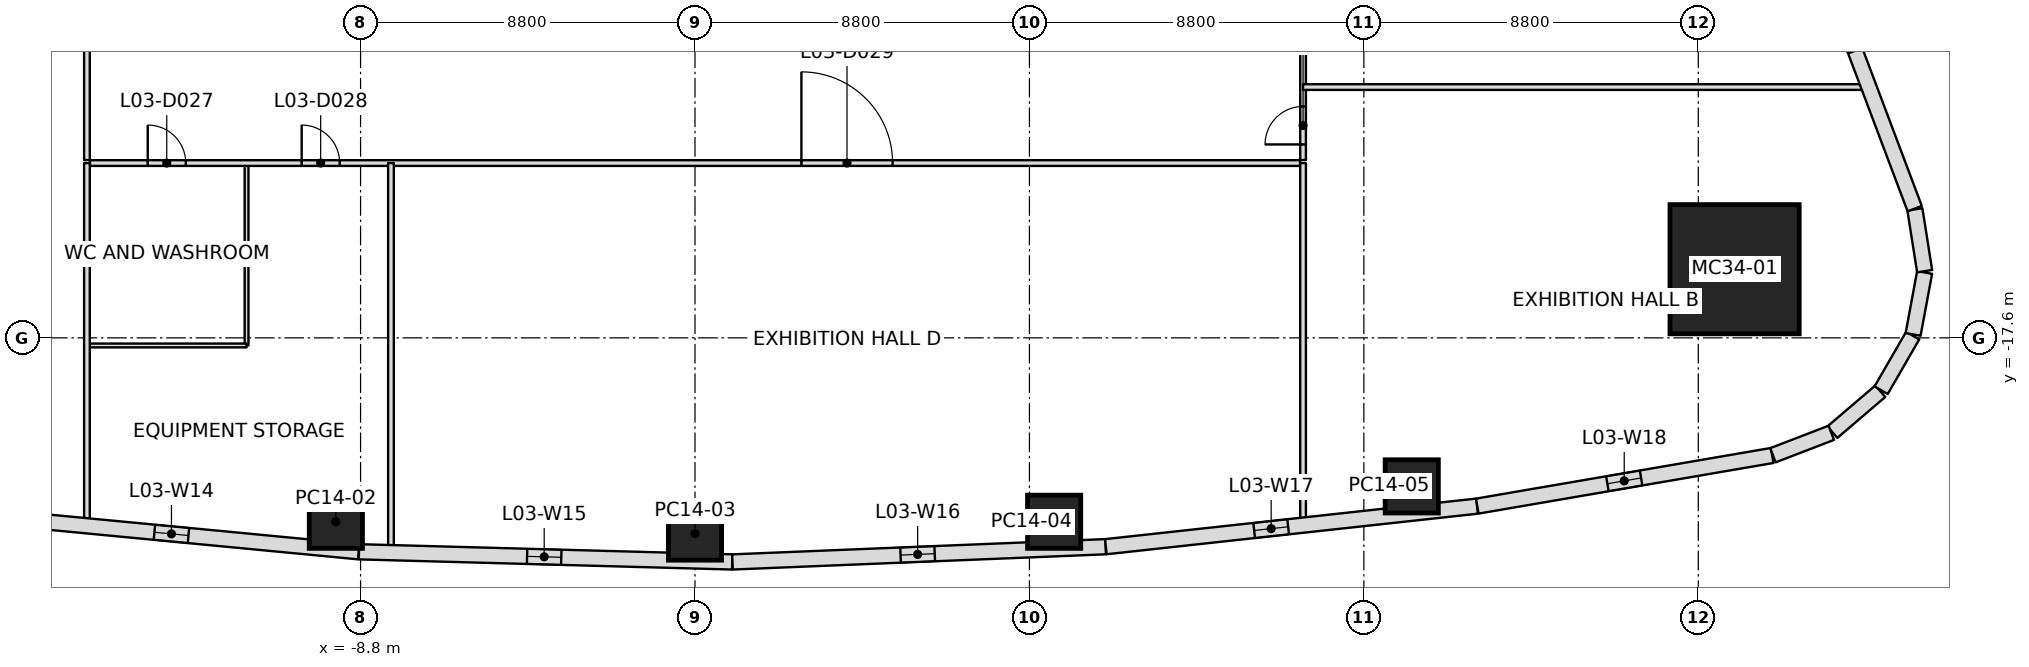
"""IFC4 building model, lengths in metres.
Left out: names, types, materials, properties, quantities, classifications, styles, units other than length and angle.
Written with IfcOpenShell. Run it as: python <this file> out.ifc"""

import sys

from ifc_helpers import new_model, si_unit, direction, frame, frame_2d, origin, origin_2d, place, context, subcontext, project, spatial, rectangle, extrude, element, fill, save


model = new_model("IFC4")
c1 = context("Model", 3, precision=1e-05, world=origin(), true_north=direction((0.0, 1.0)))
c2 = subcontext(c1, "Body", "Model", "MODEL_VIEW")
j1 = project(units=[si_unit("LENGTHUNIT", "METRE"), si_unit("PLANEANGLEUNIT", "RADIAN")], contexts=[c1])
p1 = place(None, origin())
s1 = spatial("IfcSite", under=j1, at=p1, CompositionType="ELEMENT")
p2 = place(p1, origin())
s2 = spatial("IfcBuilding", under=s1, at=p2, CompositionType="ELEMENT")
p3 = place(p2, frame((0.0, 0.0, 22.2)))
s3 = spatial("IfcBuildingStorey", under=s2, at=p3, CompositionType="ELEMENT", Elevation=22.2)
p4 = place(p3, frame((27.355, -15.793, 0.0), z_axis=(0.0, 0.0, 1.0), x_axis=(1.0, 0.0, 0.0)))
e1 = element("IfcColumn", 1, at=p4, inside=s3, PredefinedType="COLUMN", context=c2, shape_type="SweptSolid", body=[
    extrude(rectangle(XDim=3.4, YDim=3.4, at=origin_2d()), origin(), (0.0, 0.0, 1.0), 6.6),
])
for number, where, z_axis, x_axis in (
    (2, (-9.45, -22.439, 0.0), (0.0, 0.0, 1.0), (-0.998, 0.066, 0.0)),
    (3, (0.0, -22.75, 0.0), (0.0, 0.0, 1.0), (1.0, 0.0, 0.0)),
    (4, (9.45, -22.439, 0.0), (0.0, 0.0, 1.0), (0.998, 0.066, 0.0)),
    (5, (18.86, -21.508, 0.0), (0.0, 0.0, 1.0), (0.991, 0.131, 0.0)),
):
    element("IfcColumn", number, at=place(p3, frame(where, z_axis=z_axis, x_axis=x_axis)), inside=s3, PredefinedType="COLUMN", context=c2, shape_type="SweptSolid", body=[
        extrude(rectangle(XDim=1.4, YDim=1.4, at=origin_2d()), origin(), (0.0, 0.0, 1.0), 6.6),
    ])
for number, where, z_axis, x_axis in (
    (6, (31.19, -19.003, 0.0), (0.0, 0.0, 1.0), (-0.76, -0.65, 0.0)),
    (7, (32.041, -17.541, 0.0), (0.0, 0.0, 1.0), (-0.5, -0.866, 0.0)),
    (8, (32.355, -15.878, 0.0), (0.0, 0.0, 1.0), (-0.183, -0.983, 0.0)),
):
    element("IfcWall", number, at=place(p3, frame(where, z_axis=z_axis, x_axis=x_axis)), inside=s3, PredefinedType="STANDARD", context=c2, shape_type="SweptSolid", body=[
        extrude(rectangle(XDim=1.659, YDim=0.4, at=frame_2d((0.829, 0.0))), origin(), (0.0, 0.0, 1.0), 5.7),
    ])
p5 = place(p3, frame((32.099, -14.219, 0.0), z_axis=(0.0, 0.0, 1.0), x_axis=(0.155711266073, -0.98780261268, 0.0)))
e9 = element("IfcWall", 9, at=p5, inside=s3, PredefinedType="STANDARD", context=c2, shape_type="SweptSolid", body=[
    extrude(rectangle(XDim=1.646, YDim=0.4, at=frame_2d((0.823, 0.0))), origin(), (0.0, 0.0, 1.0), 5.7),
])
p6 = place(p3, frame((28.625, -4.993, 0.0), z_axis=(0.0, 0.0, 1.0), x_axis=(0.352569865932, -0.935785493389, 0.0)))
e10 = element("IfcWall", 10, at=p6, inside=s3, PredefinedType="STANDARD", context=c2, shape_type="SweptSolid", body=[
    extrude(rectangle(XDim=9.838, YDim=0.4, at=frame_2d((4.919, 0.0))), origin(), (0.0, 0.0, 1.0), 5.7),
])
p7 = place(p6, frame((4.5, 0.0, 0.9)))
e11 = element("IfcOpeningElement", 11, at=p7, cuts=e10, PredefinedType="OPENING", context=c2, shape_type="SweptSolid", body=[
    extrude(rectangle(XDim=0.9, YDim=3.3, at=frame_2d((0.45, 1.65))), frame((0.0, 0.2, 0.0), z_axis=(0.0, -1.0, 0.0), x_axis=(1.0, 0.0, 0.0)), (0.0, 0.0, 1.0), 0.4),
])
p8 = place(p3, frame((-8.849, -23.229, 0.0), z_axis=(0.0, 0.0, 1.0), x_axis=(-0.995471095278, 0.095064706733, 0.0)))
e12 = element("IfcWall", 12, at=p8, inside=s3, PredefinedType="STANDARD", context=c2, shape_type="SweptSolid", body=[
    extrude(rectangle(XDim=9.826, YDim=0.4, at=frame_2d((4.913, 0.0))), origin(), (0.0, 0.0, 1.0), 5.7),
])
p9 = place(p8, frame((4.5, 0.0, 0.9)))
e13 = element("IfcOpeningElement", 13, at=p9, cuts=e12, PredefinedType="OPENING", context=c2, shape_type="SweptSolid", body=[
    extrude(rectangle(XDim=0.9, YDim=3.3, at=frame_2d((0.45, 1.65))), frame((0.0, 0.2, 0.0), z_axis=(0.0, -1.0, 0.0), x_axis=(1.0, 0.0, 0.0)), (0.0, 0.0, 1.0), 0.4),
])
p10 = place(p3, frame((0.98, -23.497, 0.0), z_axis=(0.0, 0.0, 1.0), x_axis=(-0.999629782494, 0.027208416899, 0.0)))
e14 = element("IfcWall", 14, at=p10, inside=s3, PredefinedType="STANDARD", context=c2, shape_type="SweptSolid", body=[
    extrude(rectangle(XDim=9.825, YDim=0.4, at=frame_2d((4.913, 0.0))), origin(), (0.0, 0.0, 1.0), 5.7),
])
p11 = place(p10, frame((4.5, 0.0, 0.9)))
e15 = element("IfcOpeningElement", 15, at=p11, cuts=e14, PredefinedType="OPENING", context=c2, shape_type="SweptSolid", body=[
    extrude(rectangle(XDim=0.9, YDim=3.3, at=frame_2d((0.45, 1.65))), frame((0.0, 0.2, 0.0), z_axis=(0.0, -1.0, 0.0), x_axis=(1.0, 0.0, 0.0)), (0.0, 0.0, 1.0), 0.4),
])
p12 = place(p3, frame((10.804, -23.096, 0.0), z_axis=(0.0, 0.0, 1.0), x_axis=(-0.999167350404, -0.04079958195, 0.0)))
e16 = element("IfcWall", 16, at=p12, inside=s3, PredefinedType="STANDARD", context=c2, shape_type="SweptSolid", body=[
    extrude(rectangle(XDim=9.826, YDim=0.4, at=frame_2d((4.913, 0.0))), origin(), (0.0, 0.0, 1.0), 5.7),
])
p13 = place(p12, frame((4.5, 0.0, 0.9)))
e17 = element("IfcOpeningElement", 17, at=p13, cuts=e16, PredefinedType="OPENING", context=c2, shape_type="SweptSolid", body=[
    extrude(rectangle(XDim=0.9, YDim=3.3, at=frame_2d((0.45, 1.65))), frame((0.0, 0.2, 0.0), z_axis=(0.0, -1.0, 0.0), x_axis=(1.0, 0.0, 0.0)), (0.0, 0.0, 1.0), 0.4),
])
p14 = place(p3, frame((20.579, -22.028, 0.0), z_axis=(0.0, 0.0, 1.0), x_axis=(-0.994084776508, -0.108606892574, 0.0)))
e18 = element("IfcWall", 18, at=p14, inside=s3, PredefinedType="STANDARD", context=c2, shape_type="SweptSolid", body=[
    extrude(rectangle(XDim=9.826, YDim=0.4, at=frame_2d((4.913, 0.0))), origin(), (0.0, 0.0, 1.0), 5.7),
])
p15 = place(p14, frame((5.0, 0.0, 0.9)))
e19 = element("IfcOpeningElement", 19, at=p15, cuts=e18, PredefinedType="OPENING", context=c2, shape_type="SweptSolid", body=[
    extrude(rectangle(XDim=0.9, YDim=3.3, at=frame_2d((0.45, 1.65))), frame((0.0, 0.2, 0.0), z_axis=(0.0, -1.0, 0.0), x_axis=(1.0, 0.0, 0.0)), (0.0, 0.0, 1.0), 0.4),
])
p16 = place(p3, frame((28.344, -20.695, 0.0), z_axis=(0.0, 0.0, 1.0), x_axis=(-0.985573227811, -0.169249557228, 0.0)))
e20 = element("IfcWall", 20, at=p16, inside=s3, PredefinedType="STANDARD", context=c2, shape_type="SweptSolid", body=[
    extrude(rectangle(XDim=7.873, YDim=0.4, at=frame_2d((3.937, 0.0))), origin(), (0.0, 0.0, 1.0), 5.7),
])
p17 = place(p16, frame((3.5, 0.0, 0.9)))
e21 = element("IfcOpeningElement", 21, at=p17, cuts=e20, PredefinedType="OPENING", context=c2, shape_type="SweptSolid", body=[
    extrude(rectangle(XDim=0.9, YDim=3.3, at=frame_2d((0.45, 1.65))), frame((0.0, 0.2, 0.0), z_axis=(0.0, -1.0, 0.0), x_axis=(1.0, 0.0, 0.0)), (0.0, 0.0, 1.0), 0.4),
])
p18 = place(p3, frame((29.9, -20.098, 0.0), z_axis=(0.0, 0.0, 1.0), x_axis=(-0.933315023429, -0.359058584415, 0.0)))
e22 = element("IfcWall", 22, at=p18, inside=s3, PredefinedType="STANDARD", context=c2, shape_type="SweptSolid", body=[
    extrude(rectangle(XDim=1.646, YDim=0.4, at=frame_2d((0.823, 0.0))), origin(), (0.0, 0.0, 1.0), 5.7),
])
p19 = place(p3, frame((-16.0, -13.0, 0.0), z_axis=(0.0, 0.0, 1.0), x_axis=(0.0, -1.0, 0.0)))
e23 = element("IfcWall", 23, at=p19, inside=s3, PredefinedType="PARTITIONING", context=c2, shape_type="SweptSolid", body=[
    extrude(rectangle(XDim=9.488, YDim=0.15, at=frame_2d((4.744, 0.0))), origin(), (0.0, 0.0, 1.0), 5.734),
])
p20 = place(p3, frame((-8.0, -13.0, 0.0), z_axis=(0.0, 0.0, 1.0), x_axis=(0.0, -1.0, 0.0)))
e24 = element("IfcWall", 24, at=p20, inside=s3, PredefinedType="PARTITIONING", context=c2, shape_type="SweptSolid", body=[
    extrude(rectangle(XDim=10.155, YDim=0.15, at=frame_2d((5.078, 0.0))), origin(), (0.0, 0.0, 1.0), 5.734),
])
p21 = place(p3, frame((16.0, -13.0, 0.0), z_axis=(0.0, 0.0, 1.0), x_axis=(0.0, -1.0, 0.0)))
e25 = element("IfcWall", 25, at=p21, inside=s3, PredefinedType="PARTITIONING", context=c2, shape_type="SweptSolid", body=[
    extrude(rectangle(XDim=9.488, YDim=0.15, at=frame_2d((4.744, 0.0))), origin(), (0.0, 0.0, 1.0), 5.734),
])
p22 = place(p3, frame((16.0, -11.0, 0.0), z_axis=(0.0, 0.0, 1.0), x_axis=(1.0, 0.0, 0.0)))
e26 = element("IfcWall", 26, at=p22, inside=s3, PredefinedType="PARTITIONING", context=c2, shape_type="SweptSolid", body=[
    extrude(rectangle(XDim=14.839, YDim=0.15, at=frame_2d((7.419, 0.0))), origin(), (0.0, 0.0, 1.0), 5.447),
])
p23 = place(p3, frame((-16.0, 12.92, 0.0), z_axis=(0.0, 0.0, 1.0), x_axis=(0.0, -1.0, 0.0)))
e27 = element("IfcWall", 27, at=p23, inside=s3, PredefinedType="PARTITIONING", context=c2, shape_type="SweptSolid", body=[
    extrude(rectangle(XDim=25.84, YDim=0.15, at=frame_2d((12.92, 0.0))), origin(), (0.0, 0.0, 1.0), 5.447),
])
p24 = place(p23, frame((11.73, 0.0, 0.0)))
e28 = element("IfcOpeningElement", 28, at=p24, cuts=e27, PredefinedType="OPENING", context=c2, shape_type="SweptSolid", body=[
    extrude(rectangle(XDim=2.4, YDim=2.1, at=frame_2d((1.2, 1.05))), frame((0.0, 0.075, 0.0), z_axis=(0.0, -1.0, 0.0), x_axis=(1.0, 0.0, 0.0)), (0.0, 0.0, 1.0), 0.15),
])
p25 = place(p3, frame((-15.92, -13.0, 0.0), z_axis=(0.0, 0.0, 1.0), x_axis=(1.0, 0.0, 0.0)))
e29 = element("IfcWall", 29, at=p25, inside=s3, PredefinedType="PARTITIONING", context=c2, shape_type="SweptSolid", body=[
    extrude(rectangle(XDim=31.84, YDim=0.15, at=frame_2d((15.92, 0.0))), origin(), (0.0, 0.0, 1.0), 5.747),
])
p26 = place(p25, frame((1.52, 0.0, 0.0)))
e30 = element("IfcOpeningElement", 30, at=p26, cuts=e29, PredefinedType="OPENING", context=c2, shape_type="SweptSolid", body=[
    extrude(rectangle(XDim=1.0, YDim=2.1, at=frame_2d((0.5, 1.05))), frame((0.0, 0.075, 0.0), z_axis=(0.0, -1.0, 0.0), x_axis=(1.0, 0.0, 0.0)), (0.0, 0.0, 1.0), 0.15),
])
p27 = place(p25, frame((5.57, 0.0, 0.0)))
e31 = element("IfcOpeningElement", 31, at=p27, cuts=e29, PredefinedType="OPENING", context=c2, shape_type="SweptSolid", body=[
    extrude(rectangle(XDim=1.0, YDim=2.1, at=frame_2d((0.5, 1.05))), frame((0.0, 0.075, 0.0), z_axis=(0.0, -1.0, 0.0), x_axis=(1.0, 0.0, 0.0)), (0.0, 0.0, 1.0), 0.15),
])
p28 = place(p25, frame((18.72, 0.0, 0.0)))
e32 = element("IfcOpeningElement", 32, at=p28, cuts=e29, PredefinedType="OPENING", context=c2, shape_type="SweptSolid", body=[
    extrude(rectangle(XDim=2.4, YDim=2.1, at=frame_2d((1.2, 1.05))), frame((0.0, 0.075, 0.0), z_axis=(0.0, -1.0, 0.0), x_axis=(1.0, 0.0, 0.0)), (0.0, 0.0, 1.0), 0.15),
])
p29 = place(p3, frame((16.0, -12.92, 0.0), z_axis=(0.0, 0.0, 1.0), x_axis=(0.0, 1.0, 0.0)))
e33 = element("IfcWall", 33, at=p29, inside=s3, PredefinedType="PARTITIONING", context=c2, shape_type="SweptSolid", body=[
    extrude(rectangle(XDim=25.84, YDim=0.15, at=frame_2d((12.92, 0.0))), origin(), (0.0, 0.0, 1.0), 5.447),
])
p30 = place(p29, frame((0.41, 0.0, 0.0)))
e34 = element("IfcOpeningElement", 34, at=p30, cuts=e33, PredefinedType="OPENING", context=c2, shape_type="SweptSolid", body=[
    extrude(rectangle(XDim=1.0, YDim=2.1, at=frame_2d((0.5, 1.05))), frame((0.0, 0.075, 0.0), z_axis=(0.0, -1.0, 0.0), x_axis=(1.0, 0.0, 0.0)), (0.0, 0.0, 1.0), 0.15),
])
p31 = place(p29, frame((12.72, 0.0, 0.0)))
e35 = element("IfcOpeningElement", 35, at=p31, cuts=e33, PredefinedType="OPENING", context=c2, shape_type="SweptSolid", body=[
    extrude(rectangle(XDim=2.4, YDim=2.1, at=frame_2d((1.2, 1.05))), frame((0.0, 0.075, 0.0), z_axis=(0.0, -1.0, 0.0), x_axis=(1.0, 0.0, 0.0)), (0.0, 0.0, 1.0), 0.15),
])
p32 = place(p3, frame((-11.8, -13.03, 0.0), z_axis=(0.0, 0.0, 1.0), x_axis=(0.0, -1.0, 0.0)))
e36 = element("IfcWall", 36, at=p32, inside=s3, PredefinedType="PARTITIONING", context=c2, shape_type="SweptSolid", body=[
    extrude(rectangle(XDim=4.77, YDim=0.1, at=frame_2d((2.385, 0.0))), origin(), (0.0, 0.0, 1.0), 5.95),
])
p33 = place(p3, frame((-11.8, -17.8, 0.0), z_axis=(0.0, 0.0, 1.0), x_axis=(-1.0, 0.0, 0.0)))
e37 = element("IfcWall", 37, at=p33, inside=s3, PredefinedType="PARTITIONING", context=c2, shape_type="SweptSolid", body=[
    extrude(rectangle(XDim=4.17, YDim=0.1, at=frame_2d((2.085, 0.0))), origin(), (0.0, 0.0, 1.0), 5.817),
])
p34 = place(p9, origin())
e38 = element("IfcWindow", 38, at=p34, inside=s3, PartitioningType="SINGLE_PANEL", PredefinedType="WINDOW", context=c2, shape_type="SweptSolid", body=[
    extrude(rectangle(XDim=0.9, YDim=3.3, at=frame_2d((0.45, 1.65))), frame((0.0, 0.03, 0.0), z_axis=(0.0, -1.0, 0.0), x_axis=(1.0, 0.0, 0.0)), (0.0, 0.0, 1.0), 0.06),
])
fill(e13, e38)
p35 = place(p11, origin())
e39 = element("IfcWindow", 39, at=p35, inside=s3, PartitioningType="SINGLE_PANEL", PredefinedType="WINDOW", context=c2, shape_type="SweptSolid", body=[
    extrude(rectangle(XDim=0.9, YDim=3.3, at=frame_2d((0.45, 1.65))), frame((0.0, 0.03, 0.0), z_axis=(0.0, -1.0, 0.0), x_axis=(1.0, 0.0, 0.0)), (0.0, 0.0, 1.0), 0.06),
])
fill(e15, e39)
p36 = place(p13, origin())
e40 = element("IfcWindow", 40, at=p36, inside=s3, PartitioningType="SINGLE_PANEL", PredefinedType="WINDOW", context=c2, shape_type="SweptSolid", body=[
    extrude(rectangle(XDim=0.9, YDim=3.3, at=frame_2d((0.45, 1.65))), frame((0.0, 0.03, 0.0), z_axis=(0.0, -1.0, 0.0), x_axis=(1.0, 0.0, 0.0)), (0.0, 0.0, 1.0), 0.06),
])
fill(e17, e40)
p37 = place(p15, origin())
e41 = element("IfcWindow", 41, at=p37, inside=s3, PartitioningType="SINGLE_PANEL", PredefinedType="WINDOW", context=c2, shape_type="SweptSolid", body=[
    extrude(rectangle(XDim=0.9, YDim=3.3, at=frame_2d((0.45, 1.65))), frame((0.0, 0.03, 0.0), z_axis=(0.0, -1.0, 0.0), x_axis=(1.0, 0.0, 0.0)), (0.0, 0.0, 1.0), 0.06),
])
fill(e19, e41)
p38 = place(p17, origin())
e42 = element("IfcWindow", 42, at=p38, inside=s3, PartitioningType="SINGLE_PANEL", PredefinedType="WINDOW", context=c2, shape_type="SweptSolid", body=[
    extrude(rectangle(XDim=0.9, YDim=3.3, at=frame_2d((0.45, 1.65))), frame((0.0, 0.03, 0.0), z_axis=(0.0, -1.0, 0.0), x_axis=(1.0, 0.0, 0.0)), (0.0, 0.0, 1.0), 0.06),
])
fill(e21, e42)
p39 = place(p26, origin())
e43 = element("IfcDoor", 43, at=p39, inside=s3, OperationType="SINGLE_SWING_LEFT", PredefinedType="DOOR", context=c2, shape_type="SweptSolid", body=[
    extrude(rectangle(XDim=1.0, YDim=2.1, at=frame_2d((0.5, 1.05))), frame((0.0, 0.025, 0.0), z_axis=(0.0, -1.0, 0.0), x_axis=(1.0, 0.0, 0.0)), (0.0, 0.0, 1.0), 0.05),
])
fill(e30, e43)
p40 = place(p27, origin())
e44 = element("IfcDoor", 44, at=p40, inside=s3, OperationType="SINGLE_SWING_LEFT", PredefinedType="DOOR", context=c2, shape_type="SweptSolid", body=[
    extrude(rectangle(XDim=1.0, YDim=2.1, at=frame_2d((0.5, 1.05))), frame((0.0, 0.025, 0.0), z_axis=(0.0, -1.0, 0.0), x_axis=(1.0, 0.0, 0.0)), (0.0, 0.0, 1.0), 0.05),
])
fill(e31, e44)
p41 = place(p28, origin())
e45 = element("IfcDoor", 45, at=p41, inside=s3, OperationType="DOUBLE_DOOR_SINGLE_SWING", PredefinedType="DOOR", context=c2, shape_type="SweptSolid", body=[
    extrude(rectangle(XDim=2.4, YDim=2.1, at=frame_2d((1.2, 1.05))), frame((0.0, 0.025, 0.0), z_axis=(0.0, -1.0, 0.0), x_axis=(1.0, 0.0, 0.0)), (0.0, 0.0, 1.0), 0.05),
])
fill(e32, e45)
p42 = place(p30, origin())
e46 = element("IfcDoor", 46, at=p42, inside=s3, OperationType="SINGLE_SWING_RIGHT", PredefinedType="DOOR", context=c2, shape_type="SweptSolid", body=[
    extrude(rectangle(XDim=1.0, YDim=2.1, at=frame_2d((0.5, 1.05))), frame((0.0, 0.025, 0.0), z_axis=(0.0, -1.0, 0.0), x_axis=(1.0, 0.0, 0.0)), (0.0, 0.0, 1.0), 0.05),
])
fill(e34, e46)
save(model, sys.argv[1])
